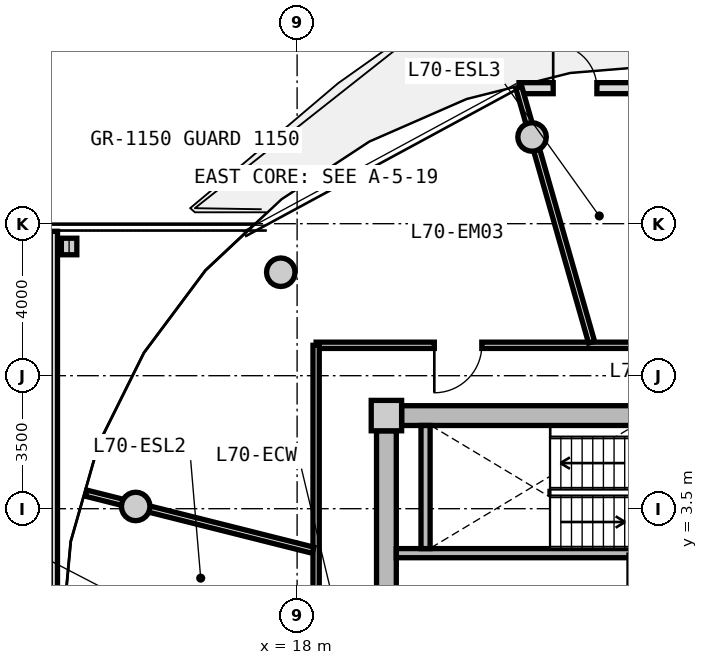
"""IFC4 building model, lengths in metres.
Left out: names, types, materials, properties, quantities, classifications, styles, units other than length and angle.
Written with IfcOpenShell. Run it as: python <this file> out.ifc"""

import sys

from ifc_helpers import new_model, si_unit, direction, frame, frame_2d, origin, origin_2d, place, context, subcontext, project, spatial, rectangle, circle, i_section, extrude, source, transform, mapped, element, fill, save


model = new_model("IFC4")
c1 = context("Model", 3, precision=1e-05, world=origin(), true_north=direction((0.0, 1.0)))
c2 = subcontext(c1, "Body", "Model", "MODEL_VIEW")
j1 = project(units=[si_unit("LENGTHUNIT", "METRE"), si_unit("PLANEANGLEUNIT", "RADIAN")], contexts=[c1])
p1 = place(None, origin())
s1 = spatial("IfcSite", under=j1, at=p1, CompositionType="ELEMENT")
p2 = place(p1, origin())
s2 = spatial("IfcBuilding", under=s1, at=p2, CompositionType="ELEMENT")
p3 = place(p2, frame((0.0, 0.0, 226.1)))
s3 = spatial("IfcBuildingStorey", under=s2, at=p3, CompositionType="ELEMENT", Elevation=226.1)
m1 = source(origin(), c2, "Body", "SweptSolid", [
    extrude(rectangle(XDim=0.8, YDim=0.8, at=origin_2d()), origin(), (0.0, 0.0, 1.0), 3.05),
])
p4 = place(p3, frame((20.35, 5.95, 0.0), z_axis=(0.0, 0.0, 1.0), x_axis=(1.0, 0.0, 0.0)))
e1 = element("IfcColumn", 1, at=p4, inside=s3, PredefinedType="COLUMN", context=c2, shape_type="MappedRepresentation", body=[
    mapped(m1, transform((0.0, 0.0, 0.0), x_axis=(1.0, 0.0, 0.0), y_axis=(0.0, 1.0, 0.0), z_axis=(0.0, 0.0, 1.0), scale=1.0)),
])
m2 = source(origin(), c2, "Body", "SweptSolid", [
    extrude(rectangle(XDim=14.5, YDim=0.52, at=frame_2d((7.25, 0.0))), origin(), (0.0, 0.0, 1.0), 2.76),
])
p5 = place(p3, frame((20.75, 5.95, 0.0), z_axis=(0.0, 0.0, 1.0), x_axis=(1.0, 0.0, 0.0)))
e2 = element("IfcWall", 2, at=p5, inside=s3, PredefinedType="SHEAR", context=c2, shape_type="MappedRepresentation", body=[
    mapped(m2, transform((0.0, 0.0, 0.0), x_axis=(1.0, 0.0, 0.0), y_axis=(0.0, 1.0, 0.0), z_axis=(0.0, 0.0, 1.0), scale=1.0)),
])
m3 = source(origin(), c2, "Body", "SweptSolid", [
    extrude(rectangle(XDim=11.1, YDim=0.52, at=frame_2d((5.55, 0.0))), origin(), (0.0, 0.0, 1.0), 2.76),
])
p6 = place(p3, frame((20.35, -5.55, 0.0), z_axis=(0.0, 0.0, 1.0), x_axis=(0.0, 1.0, 0.0)))
e3 = element("IfcWall", 3, at=p6, inside=s3, PredefinedType="SHEAR", context=c2, shape_type="MappedRepresentation", body=[
    mapped(m3, transform((0.0, 0.0, 0.0), x_axis=(1.0, 0.0, 0.0), y_axis=(0.0, 1.0, 0.0), z_axis=(0.0, 0.0, 1.0), scale=1.0)),
])
p7 = place(p6, frame((3.8, 0.0, 0.0)))
e4 = element("IfcOpeningElement", 4, at=p7, cuts=e3, PredefinedType="OPENING", context=c2, shape_type="SweptSolid", body=[
    extrude(rectangle(XDim=1.2, YDim=2.15, at=frame_2d((0.6, 1.075))), frame((0.0, 0.27, 0.0), z_axis=(0.0, -1.0, 0.0), x_axis=(1.0, 0.0, 0.0)), (0.0, 0.0, 1.0), 0.54),
])
m4 = source(origin(), c2, "Body", "SweptSolid", [
    extrude(circle(Radius=0.375, at=origin_2d()), origin(), (0.0, 0.0, 1.0), 3.05),
])
for number, where, z_axis, x_axis in (
    (5, (24.182, 13.281, 0.0), (0.0, 0.0, 1.0), (1.0, 0.0, 0.0)),
    (6, (17.57, 9.723, 0.0), (0.0, 0.0, 1.0), (1.0, 0.0, 0.0)),
    (7, (13.753, 3.559, 0.0), (0.0, 0.0, 1.0), (1.0, 0.0, 0.0)),
):
    element("IfcColumn", number, at=place(p3, frame(where, z_axis=z_axis, x_axis=x_axis)), inside=s3, PredefinedType="COLUMN", context=c2, shape_type="MappedRepresentation", body=[
        mapped(m4, transform((0.0, 0.0, 0.0), x_axis=(1.0, 0.0, 0.0), y_axis=(0.0, 1.0, 0.0), z_axis=(0.0, 0.0, 1.0), scale=1.0)),
    ])
m5 = source(origin(), c2, "Body", "SweptSolid", [
    extrude(i_section(OverallWidth=0.407, OverallDepth=0.435, WebThickness=0.024, FlangeThickness=0.039, FilletRadius=0.015, at=origin_2d()), origin(), (0.0, 0.0, 1.0), 3.05),
])
p8 = place(p3, frame((12.0, 10.4, 0.0), z_axis=(0.0, 0.0, 1.0), x_axis=(1.0, 0.0, 0.0)))
e8 = element("IfcColumn", 8, at=p8, inside=s3, PredefinedType="COLUMN", context=c2, shape_type="MappedRepresentation", body=[
    mapped(m5, transform((0.0, 0.0, 0.0), x_axis=(1.0, 0.0, 0.0), y_axis=(0.0, 1.0, 0.0), z_axis=(0.0, 0.0, 1.0), scale=1.0)),
])
m6 = source(origin(), c2, "Body", "SweptSolid", [
    extrude(rectangle(XDim=8.324, YDim=0.29, at=frame_2d((4.162, 0.0))), origin(), (0.0, 0.0, 1.0), 2.76),
])
p9 = place(p3, frame((23.838, 14.566, 0.0), z_axis=(0.0, 0.0, 1.0), x_axis=(1.0, 0.0, 0.0)))
e9 = element("IfcWall", 9, at=p9, inside=s3, PredefinedType="SOLIDWALL", context=c2, shape_type="MappedRepresentation", body=[
    mapped(m6, transform((0.0, 0.0, 0.0), x_axis=(1.0, 0.0, 0.0), y_axis=(0.0, 1.0, 0.0), z_axis=(0.0, 0.0, 1.0), scale=1.0)),
])
p10 = place(p9, frame((0.9, 0.0, 0.0)))
e10 = element("IfcOpeningElement", 10, at=p10, cuts=e9, PredefinedType="OPENING", context=c2, shape_type="SweptSolid", body=[
    extrude(rectangle(XDim=1.15, YDim=2.25, at=frame_2d((0.575, 1.125))), frame((0.0, 0.155, 0.0), z_axis=(0.0, -1.0, 0.0), x_axis=(1.0, 0.0, 0.0)), (0.0, 0.0, 1.0), 0.31),
])
p11 = place(p9, frame((5.412, 0.0, 0.85)))
e11 = element("IfcOpeningElement", 11, at=p11, cuts=e9, PredefinedType="OPENING", context=c2, shape_type="SweptSolid", body=[
    extrude(rectangle(XDim=1.2, YDim=1.5, at=frame_2d((0.6, 0.75))), frame((0.0, 0.155, 0.0), z_axis=(0.0, -1.0, 0.0), x_axis=(1.0, 0.0, 0.0)), (0.0, 0.0, 1.0), 0.31),
])
m7 = source(origin(), c2, "Body", "SweptSolid", [
    extrude(rectangle(XDim=7.93, YDim=0.24, at=frame_2d((3.965, 0.0))), origin(), (0.0, 0.0, 1.0), 2.76),
])
p12 = place(p3, frame((20.61, 2.33, 0.0), z_axis=(0.0, 0.0, 1.0), x_axis=(1.0, 0.0, 0.0)))
e12 = element("IfcWall", 12, at=p12, inside=s3, PredefinedType="PARTITIONING", context=c2, shape_type="MappedRepresentation", body=[
    mapped(m7, transform((0.0, 0.0, 0.0), x_axis=(1.0, 0.0, 0.0), y_axis=(0.0, 1.0, 0.0), z_axis=(0.0, 0.0, 1.0), scale=1.0)),
])
m8 = source(origin(), c2, "Body", "SweptSolid", [
    extrude(rectangle(XDim=3.24, YDim=0.24, at=frame_2d((1.62, 0.0))), origin(), (0.0, 0.0, 1.0), 2.76),
])
p13 = place(p3, frame((21.38, 2.45, 0.0), z_axis=(0.0, 0.0, 1.0), x_axis=(0.0, 1.0, 0.0)))
e13 = element("IfcWall", 13, at=p13, inside=s3, PredefinedType="PARTITIONING", context=c2, shape_type="MappedRepresentation", body=[
    mapped(m8, transform((0.0, 0.0, 0.0), x_axis=(1.0, 0.0, 0.0), y_axis=(0.0, 1.0, 0.0), z_axis=(0.0, 0.0, 1.0), scale=1.0)),
])
m9 = source(origin(), c2, "Body", "SweptSolid", [
    extrude(rectangle(XDim=8.58, YDim=0.165, at=frame_2d((4.29, 0.0))), origin(), (0.0, 0.0, 1.0), 2.745),
])
p14 = place(p3, frame((18.5, 7.8, 0.0), z_axis=(0.0, 0.0, 1.0), x_axis=(1.0, 0.0, 0.0)))
e14 = element("IfcWall", 14, at=p14, inside=s3, PredefinedType="PARTITIONING", context=c2, shape_type="MappedRepresentation", body=[
    mapped(m9, transform((0.0, 0.0, 0.0), x_axis=(1.0, 0.0, 0.0), y_axis=(0.0, 1.0, 0.0), z_axis=(0.0, 0.0, 1.0), scale=1.0)),
])
p15 = place(p14, frame((3.11, 0.0, 0.0)))
e15 = element("IfcOpeningElement", 15, at=p15, cuts=e14, PredefinedType="OPENING", context=c2, shape_type="SweptSolid", body=[
    extrude(rectangle(XDim=1.25, YDim=2.2, at=frame_2d((0.625, 1.1))), frame((0.0, 0.093, 0.0), z_axis=(0.0, -1.0, 0.0), x_axis=(1.0, 0.0, 0.0)), (0.0, 0.0, 1.0), 0.185),
])
m10 = source(origin(), c2, "Body", "SweptSolid", [
    extrude(rectangle(XDim=6.88, YDim=0.165, at=frame_2d((3.44, 0.0))), origin(), (0.0, 0.0, 1.0), 2.745),
])
p16 = place(p3, frame((18.5, 0.92, 0.0), z_axis=(0.0, 0.0, 1.0), x_axis=(0.0, 1.0, 0.0)))
e16 = element("IfcWall", 16, at=p16, inside=s3, PredefinedType="PARTITIONING", context=c2, shape_type="MappedRepresentation", body=[
    mapped(m10, transform((0.0, 0.0, 0.0), x_axis=(1.0, 0.0, 0.0), y_axis=(0.0, 1.0, 0.0), z_axis=(0.0, 0.0, 1.0), scale=1.0)),
])
m11 = source(origin(), c2, "Body", "SweptSolid", [
    extrude(rectangle(XDim=6.974, YDim=0.165, at=frame_2d((3.487, 0.0))), origin(), (0.0, 0.0, 1.0), 2.345),
])
p17 = place(p3, frame((25.749, 7.88, 0.0), z_axis=(0.0, 0.0, 1.0), x_axis=(-0.274707256801, 0.961527910703, 0.0)))
e17 = element("IfcWall", 17, at=p17, inside=s3, PredefinedType="PARTITIONING", context=c2, shape_type="MappedRepresentation", body=[
    mapped(m11, transform((0.0, 0.0, 0.0), x_axis=(1.0, 0.0, 0.0), y_axis=(0.0, 1.0, 0.0), z_axis=(0.0, 0.0, 1.0), scale=1.0)),
])
m12 = source(origin(), c2, "Body", "SweptSolid", [
    extrude(rectangle(XDim=6.157, YDim=0.165, at=frame_2d((3.079, 0.0))), origin(), (0.0, 0.0, 1.0), 2.345),
])
p18 = place(p3, frame((18.42, 2.407, 0.0), z_axis=(0.0, 0.0, 1.0), x_axis=(-0.969840867184, 0.243738984038, 0.0)))
e18 = element("IfcWall", 18, at=p18, inside=s3, PredefinedType="PARTITIONING", context=c2, shape_type="MappedRepresentation", body=[
    mapped(m12, transform((0.0, 0.0, 0.0), x_axis=(1.0, 0.0, 0.0), y_axis=(0.0, 1.0, 0.0), z_axis=(0.0, 0.0, 1.0), scale=1.0)),
])
m13 = source(origin(), c2, "Body", "SweptSolid", [
    extrude(rectangle(XDim=9.88, YDim=0.19, at=frame_2d((4.94, 0.0))), origin(), (0.0, 0.0, 1.0), 2.745),
])
p19 = place(p3, frame((11.6, 0.92, 0.0), z_axis=(0.0, 0.0, 1.0), x_axis=(0.0, 1.0, 0.0)))
e19 = element("IfcWall", 19, at=p19, inside=s3, PredefinedType="PARTITIONING", context=c2, shape_type="MappedRepresentation", body=[
    mapped(m13, transform((0.0, 0.0, 0.0), x_axis=(1.0, 0.0, 0.0), y_axis=(0.0, 1.0, 0.0), z_axis=(0.0, 0.0, 1.0), scale=1.0)),
])
m14 = source(origin(), c2, "Body", "SweptSolid", [
    extrude(rectangle(XDim=1.15, YDim=2.25, at=frame_2d((0.575, 1.125))), frame((0.0, 0.025, 0.0), z_axis=(0.0, -1.0, 0.0), x_axis=(1.0, 0.0, 0.0)), (0.0, 0.0, 1.0), 0.05),
])
p20 = place(p10, origin())
e20 = element("IfcDoor", 20, at=p20, inside=s3, OperationType="SINGLE_SWING_LEFT", PredefinedType="DOOR", context=c2, shape_type="MappedRepresentation", body=[
    mapped(m14, transform((0.0, 0.0, 0.0), x_axis=(1.0, 0.0, 0.0), y_axis=(0.0, 1.0, 0.0), z_axis=(0.0, 0.0, 1.0), scale=1.0)),
])
fill(e10, e20)
m15 = source(origin(), c2, "Body", "SweptSolid", [
    extrude(rectangle(XDim=1.25, YDim=2.2, at=frame_2d((0.625, 1.1))), frame((0.0, 0.025, 0.0), z_axis=(0.0, -1.0, 0.0), x_axis=(1.0, 0.0, 0.0)), (0.0, 0.0, 1.0), 0.05),
])
p21 = place(p15, frame((1.25, 0.0, 0.0), z_axis=(0.0, 0.0, 1.0), x_axis=(-1.0, 0.0, 0.0)))
e21 = element("IfcDoor", 21, at=p21, inside=s3, OperationType="SINGLE_SWING_RIGHT", PredefinedType="DOOR", context=c2, shape_type="MappedRepresentation", body=[
    mapped(m15, transform((0.0, 0.0, 0.0), x_axis=(1.0, 0.0, 0.0), y_axis=(0.0, 1.0, 0.0), z_axis=(0.0, 0.0, 1.0), scale=1.0)),
])
fill(e15, e21)
save(model, sys.argv[1])
